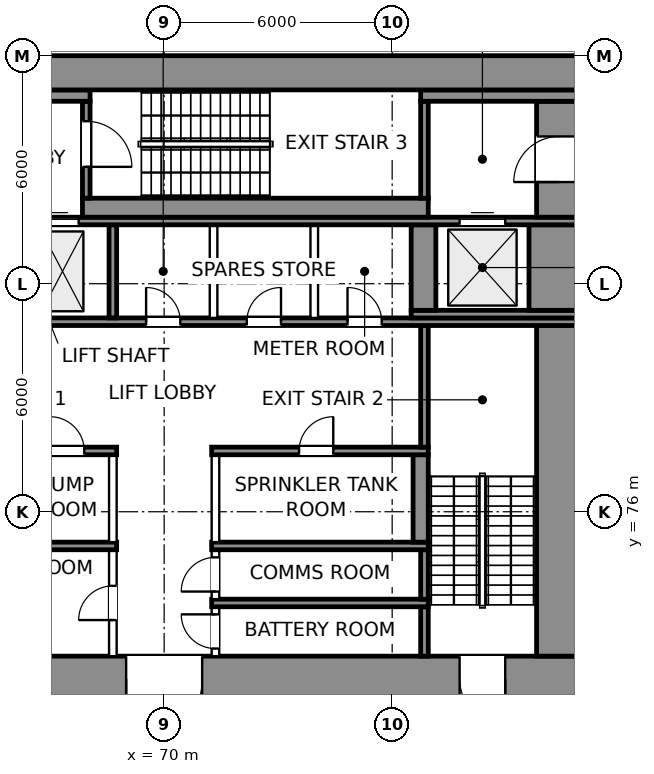
"""IFC4 building model, lengths in metres.
Left out: names, types, materials, properties, quantities, classifications, styles, units other than length and angle.
Written with IfcOpenShell. Run it as: python <this file> out.ifc"""

import sys

from ifc_helpers import new_model, si_unit, direction, frame, frame_2d, origin, place, context, subcontext, project, spatial, rectangle, extrude, element, fill, save


model = new_model("IFC4")
c1 = context("Model", 3, precision=1e-05, world=origin(), true_north=direction((0.0, 1.0)))
c2 = subcontext(c1, "Body", "Model", "MODEL_VIEW")
j1 = project(units=[si_unit("LENGTHUNIT", "METRE"), si_unit("PLANEANGLEUNIT", "RADIAN")], contexts=[c1])
p1 = place(None, origin())
s1 = spatial("IfcSite", under=j1, at=p1, CompositionType="ELEMENT")
p2 = place(p1, origin())
s2 = spatial("IfcBuilding", under=s1, at=p2, CompositionType="ELEMENT")
p3 = place(p2, frame((0.0, 0.0, -10.0)))
s3 = spatial("IfcBuildingStorey", under=s2, at=p3, CompositionType="ELEMENT", Elevation=-10.0)
p4 = place(p3, frame((59.0, 71.6, 0.0), z_axis=(0.0, 0.0, 1.0), x_axis=(1.0, 0.0, 0.0)))
e1 = element("IfcWall", 1, at=p4, inside=s3, PredefinedType="SHEAR", context=c2, shape_type="SweptSolid", body=[
    extrude(rectangle(XDim=22.0, YDim=1.2, at=frame_2d((11.0, 0.0))), origin(), (0.0, 0.0, 1.0), 5.0),
])
p5 = place(p4, frame((2.025, 0.0, 0.0)))
e2 = element("IfcOpeningElement", 2, at=p5, cuts=e1, PredefinedType="OPENING", context=c2, shape_type="SweptSolid", body=[
    extrude(rectangle(XDim=1.2, YDim=2.1, at=frame_2d((0.6, 1.05))), frame((0.0, 0.61, 0.0), z_axis=(0.0, -1.0, 0.0), x_axis=(1.0, 0.0, 0.0)), (0.0, 0.0, 1.0), 1.22),
])
p6 = place(p4, frame((18.775, 0.0, 0.0)))
e3 = element("IfcOpeningElement", 3, at=p6, cuts=e1, PredefinedType="OPENING", context=c2, shape_type="SweptSolid", body=[
    extrude(rectangle(XDim=1.2, YDim=2.1, at=frame_2d((0.6, 1.05))), frame((0.0, 0.61, 0.0), z_axis=(0.0, -1.0, 0.0), x_axis=(1.0, 0.0, 0.0)), (0.0, 0.0, 1.0), 1.22),
])
p7 = place(p4, frame((10.0, 0.0, 0.0)))
e4 = element("IfcOpeningElement", 4, at=p7, cuts=e1, PredefinedType="OPENING", context=c2, shape_type="SweptSolid", body=[
    extrude(rectangle(XDim=2.0, YDim=2.1, at=frame_2d((1.0, 1.05))), frame((0.0, 0.61, 0.0), z_axis=(0.0, -1.0, 0.0), x_axis=(1.0, 0.0, 0.0)), (0.0, 0.0, 1.0), 1.22),
])
p8 = place(p3, frame((68.65, 72.2, 0.0), z_axis=(0.0, 0.0, 1.0), x_axis=(0.0, 1.0, 0.0)))
e5 = element("IfcWall", 5, at=p8, inside=s3, PredefinedType="PARTITIONING", context=c2, shape_type="SweptSolid", body=[
    extrude(rectangle(XDim=2.8, YDim=0.2, at=frame_2d((1.4, 0.0))), origin(), (0.0, 0.0, 1.0), 4.65),
])
p9 = place(p8, frame((0.95, 0.0, 0.0)))
e6 = element("IfcOpeningElement", 6, at=p9, cuts=e5, PredefinedType="OPENING", context=c2, shape_type="SweptSolid", body=[
    extrude(rectangle(XDim=0.9, YDim=2.1, at=frame_2d((0.45, 1.05))), frame((0.0, 0.11, 0.0), z_axis=(0.0, -1.0, 0.0), x_axis=(1.0, 0.0, 0.0)), (0.0, 0.0, 1.0), 0.22),
])
p10 = place(p3, frame((71.35, 72.2, 0.0), z_axis=(0.0, 0.0, 1.0), x_axis=(0.0, 1.0, 0.0)))
e7 = element("IfcWall", 7, at=p10, inside=s3, PredefinedType="PARTITIONING", context=c2, shape_type="SweptSolid", body=[
    extrude(rectangle(XDim=1.3, YDim=0.2, at=frame_2d((0.65, 0.0))), origin(), (0.0, 0.0, 1.0), 4.65),
])
p11 = place(p10, frame((0.2, 0.0, 0.0)))
e8 = element("IfcOpeningElement", 8, at=p11, cuts=e7, PredefinedType="OPENING", context=c2, shape_type="SweptSolid", body=[
    extrude(rectangle(XDim=0.9, YDim=2.1, at=frame_2d((0.45, 1.05))), frame((0.0, 0.11, 0.0), z_axis=(0.0, -1.0, 0.0), x_axis=(1.0, 0.0, 0.0)), (0.0, 0.0, 1.0), 0.22),
])
p12 = place(p3, frame((76.85, 72.2, 0.0), z_axis=(0.0, 0.0, 1.0), x_axis=(0.0, 1.0, 0.0)))
e9 = element("IfcWall", 9, at=p12, inside=s3, PredefinedType="SHEAR", context=c2, shape_type="SweptSolid", body=[
    extrude(rectangle(XDim=1.3, YDim=0.2, at=frame_2d((0.65, 0.0))), origin(), (0.0, 0.0, 1.0), 5.0),
])
p13 = place(p3, frame((80.4, 72.2, 0.0), z_axis=(0.0, 0.0, 1.0), x_axis=(0.0, 1.0, 0.0)))
e10 = element("IfcWall", 10, at=p13, inside=s3, PredefinedType="SHEAR", context=c2, shape_type="SweptSolid", body=[
    extrude(rectangle(XDim=8.7, YDim=1.2, at=frame_2d((4.35, 0.0))), origin(), (0.0, 0.0, 1.0), 5.0),
])
p14 = place(p3, frame((71.25, 73.6, 0.0), z_axis=(0.0, 0.0, 1.0), x_axis=(1.0, 0.0, 0.0)))
e11 = element("IfcWall", 11, at=p14, inside=s3, PredefinedType="SHEAR", context=c2, shape_type="SweptSolid", body=[
    extrude(rectangle(XDim=5.7, YDim=0.2, at=frame_2d((2.85, 0.0))), origin(), (0.0, 0.0, 1.0), 5.0),
])
p15 = place(p3, frame((71.35, 73.7, 0.0), z_axis=(0.0, 0.0, 1.0), x_axis=(0.0, 1.0, 0.0)))
e12 = element("IfcWall", 12, at=p15, inside=s3, PredefinedType="PARTITIONING", context=c2, shape_type="SweptSolid", body=[
    extrude(rectangle(XDim=1.3, YDim=0.2, at=frame_2d((0.65, 0.0))), origin(), (0.0, 0.0, 1.0), 4.65),
])
p16 = place(p15, frame((0.2, 0.0, 0.0)))
e13 = element("IfcOpeningElement", 13, at=p16, cuts=e12, PredefinedType="OPENING", context=c2, shape_type="SweptSolid", body=[
    extrude(rectangle(XDim=0.9, YDim=2.1, at=frame_2d((0.45, 1.05))), frame((0.0, 0.11, 0.0), z_axis=(0.0, -1.0, 0.0), x_axis=(1.0, 0.0, 0.0)), (0.0, 0.0, 1.0), 0.22),
])
p17 = place(p3, frame((76.85, 73.7, 0.0), z_axis=(0.0, 0.0, 1.0), x_axis=(0.0, 1.0, 0.0)))
e14 = element("IfcWall", 14, at=p17, inside=s3, PredefinedType="SHEAR", context=c2, shape_type="SweptSolid", body=[
    extrude(rectangle(XDim=1.3, YDim=0.2, at=frame_2d((0.65, 0.0))), origin(), (0.0, 0.0, 1.0), 5.0),
])
for number, where, z_axis, x_axis in (
    (15, (63.05, 75.1, 0.0), (0.0, 0.0, 1.0), (1.0, 0.0, 0.0)),
    (16, (71.25, 75.1, 0.0), (0.0, 0.0, 1.0), (1.0, 0.0, 0.0)),
):
    element("IfcWall", number, at=place(p3, frame(where, z_axis=z_axis, x_axis=x_axis)), inside=s3, PredefinedType="SHEAR", context=c2, shape_type="SweptSolid", body=[
        extrude(rectangle(XDim=5.7, YDim=0.2, at=frame_2d((2.85, 0.0))), origin(), (0.0, 0.0, 1.0), 5.0),
    ])
for number, where, z_axis, x_axis in (
    (17, (68.65, 75.2, 0.0), (0.0, 0.0, 1.0), (0.0, 1.0, 0.0)),
    (18, (71.35, 75.2, 0.0), (0.0, 0.0, 1.0), (0.0, 1.0, 0.0)),
):
    element("IfcWall", number, at=place(p3, frame(where, z_axis=z_axis, x_axis=x_axis)), inside=s3, PredefinedType="PARTITIONING", context=c2, shape_type="SweptSolid", body=[
        extrude(rectangle(XDim=2.3, YDim=0.2, at=frame_2d((1.15, 0.0))), origin(), (0.0, 0.0, 1.0), 4.65),
    ])
p18 = place(p3, frame((76.75, 75.2, 0.0), z_axis=(0.0, 0.0, 1.0), x_axis=(0.0, 1.0, 0.0)))
e19 = element("IfcWall", 19, at=p18, inside=s3, PredefinedType="SHEAR", context=c2, shape_type="SweptSolid", body=[
    extrude(rectangle(XDim=2.3, YDim=0.4, at=frame_2d((1.15, 0.0))), origin(), (0.0, 0.0, 1.0), 5.0),
])
p19 = place(p3, frame((63.05, 77.6, 0.0), z_axis=(0.0, 0.0, 1.0), x_axis=(1.0, 0.0, 0.0)))
e20 = element("IfcWall", 20, at=p19, inside=s3, PredefinedType="SHEAR", context=c2, shape_type="SweptSolid", body=[
    extrude(rectangle(XDim=5.7, YDim=0.2, at=frame_2d((2.85, 0.0))), origin(), (0.0, 0.0, 1.0), 5.0),
])
p20 = place(p19, frame((1.298, 0.0, 0.0)))
e21 = element("IfcOpeningElement", 21, at=p20, cuts=e20, PredefinedType="OPENING", context=c2, shape_type="SweptSolid", body=[
    extrude(rectangle(XDim=0.9, YDim=2.1, at=frame_2d((0.45, 1.05))), frame((0.0, 0.11, 0.0), z_axis=(0.0, -1.0, 0.0), x_axis=(1.0, 0.0, 0.0)), (0.0, 0.0, 1.0), 0.22),
])
p21 = place(p19, frame((3.948, 0.0, 0.0)))
e22 = element("IfcOpeningElement", 22, at=p21, cuts=e20, PredefinedType="OPENING", context=c2, shape_type="SweptSolid", body=[
    extrude(rectangle(XDim=0.9, YDim=2.1, at=frame_2d((0.45, 1.05))), frame((0.0, 0.11, 0.0), z_axis=(0.0, -1.0, 0.0), x_axis=(1.0, 0.0, 0.0)), (0.0, 0.0, 1.0), 0.22),
])
p22 = place(p3, frame((71.25, 77.6, 0.0), z_axis=(0.0, 0.0, 1.0), x_axis=(1.0, 0.0, 0.0)))
e23 = element("IfcWall", 23, at=p22, inside=s3, PredefinedType="SHEAR", context=c2, shape_type="SweptSolid", body=[
    extrude(rectangle(XDim=5.7, YDim=0.2, at=frame_2d((2.85, 0.0))), origin(), (0.0, 0.0, 1.0), 5.0),
])
p23 = place(p22, frame((2.3, 0.0, 0.0)))
e24 = element("IfcOpeningElement", 24, at=p23, cuts=e23, PredefinedType="OPENING", context=c2, shape_type="SweptSolid", body=[
    extrude(rectangle(XDim=0.9, YDim=2.1, at=frame_2d((0.45, 1.05))), frame((0.0, 0.11, 0.0), z_axis=(0.0, -1.0, 0.0), x_axis=(1.0, 0.0, 0.0)), (0.0, 0.0, 1.0), 0.22),
])
p24 = place(p3, frame((76.85, 77.7, 0.0), z_axis=(0.0, 0.0, 1.0), x_axis=(0.0, 1.0, 0.0)))
e25 = element("IfcWall", 25, at=p24, inside=s3, PredefinedType="SHEAR", context=c2, shape_type="SweptSolid", body=[
    extrude(rectangle(XDim=3.2, YDim=0.2, at=frame_2d((1.6, 0.0))), origin(), (0.0, 0.0, 1.0), 5.0),
])
p25 = place(p3, frame((59.0, 81.0, 0.0), z_axis=(0.0, 0.0, 1.0), x_axis=(1.0, 0.0, 0.0)))
e26 = element("IfcWall", 26, at=p25, inside=s3, PredefinedType="SHEAR", context=c2, shape_type="SweptSolid", body=[
    extrude(rectangle(XDim=22.0, YDim=0.2, at=frame_2d((11.0, 0.0))), origin(), (0.0, 0.0, 1.0), 5.0),
])
p26 = place(p25, frame((10.525, 0.0, 0.0)))
e27 = element("IfcOpeningElement", 27, at=p26, cuts=e26, PredefinedType="OPENING", context=c2, shape_type="SweptSolid", body=[
    extrude(rectangle(XDim=0.9, YDim=2.1, at=frame_2d((0.45, 1.05))), frame((0.0, 0.11, 0.0), z_axis=(0.0, -1.0, 0.0), x_axis=(1.0, 0.0, 0.0)), (0.0, 0.0, 1.0), 0.22),
])
p27 = place(p25, frame((13.175, 0.0, 0.0)))
e28 = element("IfcOpeningElement", 28, at=p27, cuts=e26, PredefinedType="OPENING", context=c2, shape_type="SweptSolid", body=[
    extrude(rectangle(XDim=0.9, YDim=2.1, at=frame_2d((0.45, 1.05))), frame((0.0, 0.11, 0.0), z_axis=(0.0, -1.0, 0.0), x_axis=(1.0, 0.0, 0.0)), (0.0, 0.0, 1.0), 0.22),
])
p28 = place(p25, frame((15.825, 0.0, 0.0)))
e29 = element("IfcOpeningElement", 29, at=p28, cuts=e26, PredefinedType="OPENING", context=c2, shape_type="SweptSolid", body=[
    extrude(rectangle(XDim=0.9, YDim=2.1, at=frame_2d((0.45, 1.05))), frame((0.0, 0.11, 0.0), z_axis=(0.0, -1.0, 0.0), x_axis=(1.0, 0.0, 0.0)), (0.0, 0.0, 1.0), 0.22),
])
p29 = place(p3, frame((68.65, 81.1, 0.0), z_axis=(0.0, 0.0, 1.0), x_axis=(0.0, 1.0, 0.0)))
e30 = element("IfcWall", 30, at=p29, inside=s3, PredefinedType="SHEAR", context=c2, shape_type="SweptSolid", body=[
    extrude(rectangle(XDim=2.45, YDim=0.2, at=frame_2d((1.225, 0.0))), origin(), (0.0, 0.0, 1.0), 5.0),
])
for number, where, z_axis, x_axis in (
    (31, (71.3, 81.1, 0.0), (0.0, 0.0, 1.0), (0.0, 1.0, 0.0)),
    (32, (73.95, 81.1, 0.0), (0.0, 0.0, 1.0), (0.0, 1.0, 0.0)),
):
    element("IfcWall", number, at=place(p3, frame(where, z_axis=z_axis, x_axis=x_axis)), inside=s3, PredefinedType="PARTITIONING", context=c2, shape_type="SweptSolid", body=[
        extrude(rectangle(XDim=2.45, YDim=0.2, at=frame_2d((1.225, 0.0))), origin(), (0.0, 0.0, 1.0), 4.65),
    ])
p30 = place(p3, frame((76.5, 81.2, 0.0), z_axis=(0.0, 0.0, 1.0), x_axis=(1.0, 0.0, 0.0)))
e33 = element("IfcWall", 33, at=p30, inside=s3, PredefinedType="SHEAR", context=c2, shape_type="SweptSolid", body=[
    extrude(rectangle(XDim=4.5, YDim=0.2, at=frame_2d((2.25, 0.0))), origin(), (0.0, 0.0, 1.0), 5.0),
])
p31 = place(p3, frame((76.825, 81.3, 0.0), z_axis=(0.0, 0.0, 1.0), x_axis=(0.0, 1.0, 0.0)))
e34 = element("IfcWall", 34, at=p31, inside=s3, PredefinedType="SHEAR", context=c2, shape_type="SweptSolid", body=[
    extrude(rectangle(XDim=2.25, YDim=0.65, at=frame_2d((1.125, 0.0))), origin(), (0.0, 0.0, 1.0), 5.0),
])
p32 = place(p3, frame((80.3, 81.3, 0.0), z_axis=(0.0, 0.0, 1.0), x_axis=(0.0, 1.0, 0.0)))
e35 = element("IfcWall", 35, at=p32, inside=s3, PredefinedType="SHEAR", context=c2, shape_type="SweptSolid", body=[
    extrude(rectangle(XDim=2.25, YDim=1.4, at=frame_2d((1.125, 0.0))), origin(), (0.0, 0.0, 1.0), 5.0),
])
p33 = place(p3, frame((59.0, 83.65, 0.0), z_axis=(0.0, 0.0, 1.0), x_axis=(1.0, 0.0, 0.0)))
e36 = element("IfcWall", 36, at=p33, inside=s3, PredefinedType="SHEAR", context=c2, shape_type="SweptSolid", body=[
    extrude(rectangle(XDim=22.0, YDim=0.2, at=frame_2d((11.0, 0.0))), origin(), (0.0, 0.0, 1.0), 5.0),
])
p34 = place(p33, frame((5.125, 0.0, 0.0)))
e37 = element("IfcOpeningElement", 37, at=p34, cuts=e36, PredefinedType="OPENING", context=c2, shape_type="SweptSolid", body=[
    extrude(rectangle(XDim=1.1, YDim=2.1, at=frame_2d((0.55, 1.05))), frame((0.0, 0.11, 0.0), z_axis=(0.0, -1.0, 0.0), x_axis=(1.0, 0.0, 0.0)), (0.0, 0.0, 1.0), 0.22),
])
p35 = place(p33, frame((7.65, 0.0, 0.0)))
e38 = element("IfcOpeningElement", 38, at=p35, cuts=e36, PredefinedType="OPENING", context=c2, shape_type="SweptSolid", body=[
    extrude(rectangle(XDim=1.1, YDim=2.1, at=frame_2d((0.55, 1.05))), frame((0.0, 0.11, 0.0), z_axis=(0.0, -1.0, 0.0), x_axis=(1.0, 0.0, 0.0)), (0.0, 0.0, 1.0), 0.22),
])
p36 = place(p33, frame((18.775, 0.0, 0.0)))
e39 = element("IfcOpeningElement", 39, at=p36, cuts=e36, PredefinedType="OPENING", context=c2, shape_type="SweptSolid", body=[
    extrude(rectangle(XDim=1.2, YDim=2.1, at=frame_2d((0.6, 1.05))), frame((0.0, 0.11, 0.0), z_axis=(0.0, -1.0, 0.0), x_axis=(1.0, 0.0, 0.0)), (0.0, 0.0, 1.0), 0.22),
])
p37 = place(p33, frame((2.075, 0.0, 0.0)))
e40 = element("IfcOpeningElement", 40, at=p37, cuts=e36, PredefinedType="OPENING", context=c2, shape_type="SweptSolid", body=[
    extrude(rectangle(XDim=1.1, YDim=2.1, at=frame_2d((0.55, 1.05))), frame((0.0, 0.11, 0.0), z_axis=(0.0, -1.0, 0.0), x_axis=(1.0, 0.0, 0.0)), (0.0, 0.0, 1.0), 0.22),
])
p38 = place(p3, frame((67.85, 84.0, 0.0), z_axis=(0.0, 0.0, 1.0), x_axis=(1.0, 0.0, 0.0)))
e41 = element("IfcWall", 41, at=p38, inside=s3, PredefinedType="SHEAR", context=c2, shape_type="SweptSolid", body=[
    extrude(rectangle(XDim=9.1, YDim=0.5, at=frame_2d((4.55, 0.0))), origin(), (0.0, 0.0, 1.0), 5.0),
])
p39 = place(p3, frame((80.4, 83.75, 0.0), z_axis=(0.0, 0.0, 1.0), x_axis=(0.0, 1.0, 0.0)))
e42 = element("IfcWall", 42, at=p39, inside=s3, PredefinedType="SHEAR", context=c2, shape_type="SweptSolid", body=[
    extrude(rectangle(XDim=3.05, YDim=1.2, at=frame_2d((1.525, 0.0))), origin(), (0.0, 0.0, 1.0), 5.0),
])
p40 = place(p39, frame((0.925, 0.0, 0.0)))
e43 = element("IfcOpeningElement", 43, at=p40, cuts=e42, PredefinedType="OPENING", context=c2, shape_type="SweptSolid", body=[
    extrude(rectangle(XDim=1.2, YDim=2.1, at=frame_2d((0.6, 1.05))), frame((0.0, 0.61, 0.0), z_axis=(0.0, -1.0, 0.0), x_axis=(1.0, 0.0, 0.0)), (0.0, 0.0, 1.0), 1.22),
])
p41 = place(p3, frame((67.95, 84.25, 0.0), z_axis=(0.0, 0.0, 1.0), x_axis=(0.0, 1.0, 0.0)))
e44 = element("IfcWall", 44, at=p41, inside=s3, PredefinedType="SHEAR", context=c2, shape_type="SweptSolid", body=[
    extrude(rectangle(XDim=2.55, YDim=0.2, at=frame_2d((1.275, 0.0))), origin(), (0.0, 0.0, 1.0), 5.0),
])
p42 = place(p41, frame((0.825, 0.0, 0.0)))
e45 = element("IfcOpeningElement", 45, at=p42, cuts=e44, PredefinedType="OPENING", context=c2, shape_type="SweptSolid", body=[
    extrude(rectangle(XDim=1.2, YDim=2.1, at=frame_2d((0.6, 1.05))), frame((0.0, 0.11, 0.0), z_axis=(0.0, -1.0, 0.0), x_axis=(1.0, 0.0, 0.0)), (0.0, 0.0, 1.0), 0.22),
])
p43 = place(p3, frame((76.85, 84.25, 0.0), z_axis=(0.0, 0.0, 1.0), x_axis=(0.0, 1.0, 0.0)))
e46 = element("IfcWall", 46, at=p43, inside=s3, PredefinedType="SHEAR", context=c2, shape_type="SweptSolid", body=[
    extrude(rectangle(XDim=2.55, YDim=0.2, at=frame_2d((1.275, 0.0))), origin(), (0.0, 0.0, 1.0), 5.0),
])
p44 = place(p3, frame((59.0, 86.95, 0.0), z_axis=(0.0, 0.0, 1.0), x_axis=(1.0, 0.0, 0.0)))
e47 = element("IfcWall", 47, at=p44, inside=s3, PredefinedType="SHEAR", context=c2, shape_type="SweptSolid", body=[
    extrude(rectangle(XDim=9.05, YDim=0.3, at=frame_2d((4.525, 0.0))), origin(), (0.0, 0.0, 1.0), 5.0),
])
p45 = place(p3, frame((76.75, 86.95, 0.0), z_axis=(0.0, 0.0, 1.0), x_axis=(1.0, 0.0, 0.0)))
e48 = element("IfcWall", 48, at=p45, inside=s3, PredefinedType="SHEAR", context=c2, shape_type="SweptSolid", body=[
    extrude(rectangle(XDim=4.25, YDim=0.3, at=frame_2d((2.125, 0.0))), origin(), (0.0, 0.0, 1.0), 5.0),
])
p46 = place(p3, frame((59.0, 87.55, 0.0), z_axis=(0.0, 0.0, 1.0), x_axis=(1.0, 0.0, 0.0)))
e49 = element("IfcWall", 49, at=p46, inside=s3, PredefinedType="SHEAR", context=c2, shape_type="SweptSolid", body=[
    extrude(rectangle(XDim=22.0, YDim=0.9, at=frame_2d((11.0, 0.0))), origin(), (0.0, 0.0, 1.0), 5.0),
])
p47 = place(p6, frame((1.2, 0.0, 0.0), z_axis=(0.0, 0.0, 1.0), x_axis=(-1.0, 0.0, 0.0)))
e50 = element("IfcDoor", 50, at=p47, inside=s3, OperationType="SINGLE_SWING_LEFT", PredefinedType="DOOR", context=c2, shape_type="SweptSolid", body=[
    extrude(rectangle(XDim=1.2, YDim=2.1, at=frame_2d((0.6, 1.05))), frame((0.0, 0.025, 0.0), z_axis=(0.0, -1.0, 0.0), x_axis=(1.0, 0.0, 0.0)), (0.0, 0.0, 1.0), 0.05),
])
fill(e3, e50)
p48 = place(p42, frame((1.2, 0.0, 0.0), z_axis=(0.0, 0.0, 1.0), x_axis=(-1.0, 0.0, 0.0)))
e51 = element("IfcDoor", 51, at=p48, inside=s3, OperationType="SINGLE_SWING_RIGHT", PredefinedType="DOOR", context=c2, shape_type="SweptSolid", body=[
    extrude(rectangle(XDim=1.2, YDim=2.1, at=frame_2d((0.6, 1.05))), frame((0.0, 0.025, 0.0), z_axis=(0.0, -1.0, 0.0), x_axis=(1.0, 0.0, 0.0)), (0.0, 0.0, 1.0), 0.05),
])
fill(e45, e51)
p49 = place(p7, frame((2.0, 0.0, 0.0), z_axis=(0.0, 0.0, 1.0), x_axis=(-1.0, 0.0, 0.0)))
e52 = element("IfcDoor", 52, at=p49, inside=s3, OperationType="DOUBLE_DOOR_SINGLE_SWING", PredefinedType="DOOR", context=c2, shape_type="SweptSolid", body=[
    extrude(rectangle(XDim=2.0, YDim=2.1, at=frame_2d((1.0, 1.05))), frame((0.0, 0.025, 0.0), z_axis=(0.0, -1.0, 0.0), x_axis=(1.0, 0.0, 0.0)), (0.0, 0.0, 1.0), 0.05),
])
fill(e4, e52)
p50 = place(p9, origin())
e53 = element("IfcDoor", 53, at=p50, inside=s3, OperationType="SINGLE_SWING_LEFT", PredefinedType="DOOR", context=c2, shape_type="SweptSolid", body=[
    extrude(rectangle(XDim=0.9, YDim=2.1, at=frame_2d((0.45, 1.05))), frame((0.0, 0.025, 0.0), z_axis=(0.0, -1.0, 0.0), x_axis=(1.0, 0.0, 0.0)), (0.0, 0.0, 1.0), 0.05),
])
fill(e6, e53)
p51 = place(p11, origin())
e54 = element("IfcDoor", 54, at=p51, inside=s3, OperationType="SINGLE_SWING_RIGHT", PredefinedType="DOOR", context=c2, shape_type="SweptSolid", body=[
    extrude(rectangle(XDim=0.9, YDim=2.1, at=frame_2d((0.45, 1.05))), frame((0.0, 0.025, 0.0), z_axis=(0.0, -1.0, 0.0), x_axis=(1.0, 0.0, 0.0)), (0.0, 0.0, 1.0), 0.05),
])
fill(e8, e54)
p52 = place(p16, origin())
e55 = element("IfcDoor", 55, at=p52, inside=s3, OperationType="SINGLE_SWING_LEFT", PredefinedType="DOOR", context=c2, shape_type="SweptSolid", body=[
    extrude(rectangle(XDim=0.9, YDim=2.1, at=frame_2d((0.45, 1.05))), frame((0.0, 0.025, 0.0), z_axis=(0.0, -1.0, 0.0), x_axis=(1.0, 0.0, 0.0)), (0.0, 0.0, 1.0), 0.05),
])
fill(e13, e55)
p53 = place(p40, origin())
e56 = element("IfcDoor", 56, at=p53, inside=s3, OperationType="SINGLE_SWING_LEFT", PredefinedType="DOOR", context=c2, shape_type="SweptSolid", body=[
    extrude(rectangle(XDim=1.2, YDim=2.1, at=frame_2d((0.6, 1.05))), frame((0.0, 0.025, 0.0), z_axis=(0.0, -1.0, 0.0), x_axis=(1.0, 0.0, 0.0)), (0.0, 0.0, 1.0), 0.05),
])
fill(e43, e56)
p54 = place(p35, origin())
e57 = element("IfcDoor", 57, at=p54, inside=s3, OperationType="DOUBLE_DOOR_SLIDING", PredefinedType="DOOR", context=c2, shape_type="SweptSolid", body=[
    extrude(rectangle(XDim=1.1, YDim=2.1, at=frame_2d((0.55, 1.05))), frame((0.0, 0.025, 0.0), z_axis=(0.0, -1.0, 0.0), x_axis=(1.0, 0.0, 0.0)), (0.0, 0.0, 1.0), 0.05),
])
fill(e38, e57)
p55 = place(p36, origin())
e58 = element("IfcDoor", 58, at=p55, inside=s3, OperationType="DOUBLE_DOOR_SLIDING", PredefinedType="DOOR", context=c2, shape_type="SweptSolid", body=[
    extrude(rectangle(XDim=1.2, YDim=2.1, at=frame_2d((0.6, 1.05))), frame((0.0, 0.025, 0.0), z_axis=(0.0, -1.0, 0.0), x_axis=(1.0, 0.0, 0.0)), (0.0, 0.0, 1.0), 0.05),
])
fill(e39, e58)
p56 = place(p21, origin())
e59 = element("IfcDoor", 59, at=p56, inside=s3, OperationType="SINGLE_SWING_LEFT", PredefinedType="DOOR", context=c2, shape_type="SweptSolid", body=[
    extrude(rectangle(XDim=0.9, YDim=2.1, at=frame_2d((0.45, 1.05))), frame((0.0, 0.025, 0.0), z_axis=(0.0, -1.0, 0.0), x_axis=(1.0, 0.0, 0.0)), (0.0, 0.0, 1.0), 0.05),
])
fill(e22, e59)
p57 = place(p23, origin())
e60 = element("IfcDoor", 60, at=p57, inside=s3, OperationType="SINGLE_SWING_RIGHT", PredefinedType="DOOR", context=c2, shape_type="SweptSolid", body=[
    extrude(rectangle(XDim=0.9, YDim=2.1, at=frame_2d((0.45, 1.05))), frame((0.0, 0.025, 0.0), z_axis=(0.0, -1.0, 0.0), x_axis=(1.0, 0.0, 0.0)), (0.0, 0.0, 1.0), 0.05),
])
fill(e24, e60)
p58 = place(p26, origin())
e61 = element("IfcDoor", 61, at=p58, inside=s3, OperationType="SINGLE_SWING_LEFT", PredefinedType="DOOR", context=c2, shape_type="SweptSolid", body=[
    extrude(rectangle(XDim=0.9, YDim=2.1, at=frame_2d((0.45, 1.05))), frame((0.0, 0.025, 0.0), z_axis=(0.0, -1.0, 0.0), x_axis=(1.0, 0.0, 0.0)), (0.0, 0.0, 1.0), 0.05),
])
fill(e27, e61)
p59 = place(p27, origin())
e62 = element("IfcDoor", 62, at=p59, inside=s3, OperationType="SINGLE_SWING_RIGHT", PredefinedType="DOOR", context=c2, shape_type="SweptSolid", body=[
    extrude(rectangle(XDim=0.9, YDim=2.1, at=frame_2d((0.45, 1.05))), frame((0.0, 0.025, 0.0), z_axis=(0.0, -1.0, 0.0), x_axis=(1.0, 0.0, 0.0)), (0.0, 0.0, 1.0), 0.05),
])
fill(e28, e62)
p60 = place(p28, origin())
e63 = element("IfcDoor", 63, at=p60, inside=s3, OperationType="SINGLE_SWING_LEFT", PredefinedType="DOOR", context=c2, shape_type="SweptSolid", body=[
    extrude(rectangle(XDim=0.9, YDim=2.1, at=frame_2d((0.45, 1.05))), frame((0.0, 0.025, 0.0), z_axis=(0.0, -1.0, 0.0), x_axis=(1.0, 0.0, 0.0)), (0.0, 0.0, 1.0), 0.05),
])
fill(e29, e63)
save(model, sys.argv[1])
